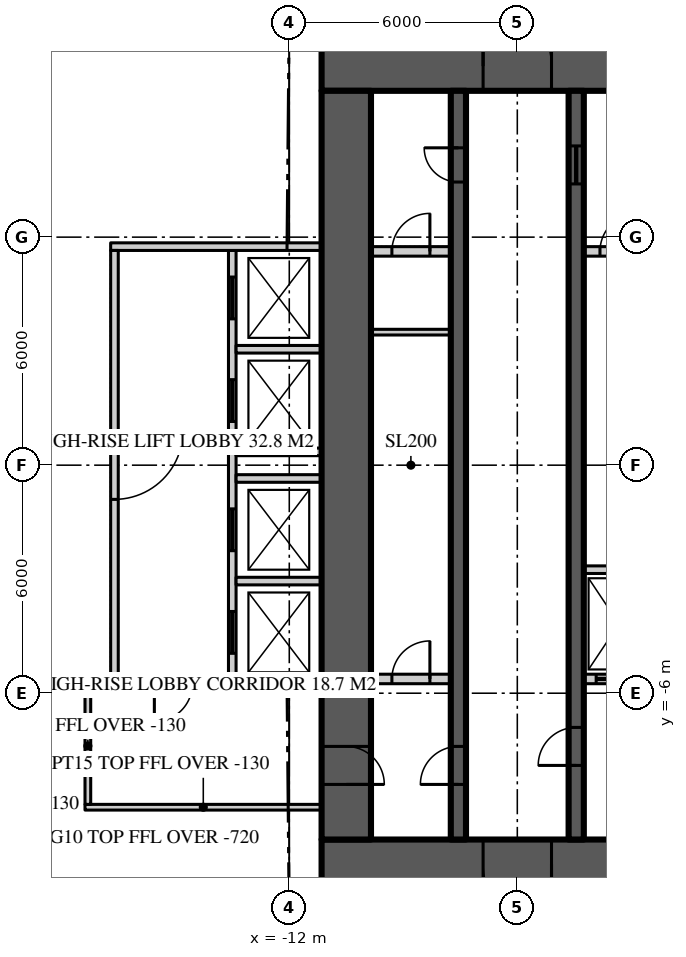
"""IFC4 building model, lengths in metres.
Left out: names, types, materials, properties, quantities, classifications, styles, units other than length and angle.
Written with IfcOpenShell. Run it as: python <this file> out.ifc"""

import sys

from ifc_helpers import new_model, si_unit, direction, frame, frame_2d, origin, place, context, subcontext, project, spatial, rectangle, extrude, element, fill, save


model = new_model("IFC4")
c1 = context("Model", 3, precision=1e-05, world=origin(), true_north=direction((0.0, 1.0)))
c2 = subcontext(c1, "Body", "Model", "MODEL_VIEW")
j1 = project(units=[si_unit("LENGTHUNIT", "METRE"), si_unit("PLANEANGLEUNIT", "RADIAN")], contexts=[c1])
p1 = place(None, origin())
s1 = spatial("IfcSite", under=j1, at=p1, CompositionType="ELEMENT")
p2 = place(p1, origin())
s2 = spatial("IfcBuilding", under=s1, at=p2, CompositionType="ELEMENT")
p3 = place(p2, frame((0.0, 0.0, 251.7)))
s3 = spatial("IfcBuildingStorey", under=s2, at=p3, CompositionType="ELEMENT", Elevation=251.7)
p4 = place(p3, frame((-11.15, 10.5, 0.0), z_axis=(0.0, 0.0, 1.0), x_axis=(1.0, 0.0, 0.0)))
e1 = element("IfcWall", 1, at=p4, inside=s3, PredefinedType="SHEAR", context=c2, shape_type="SweptSolid", body=[
    extrude(rectangle(XDim=22.3, YDim=1.3, at=frame_2d((11.15, 0.0))), origin(), (0.0, 0.0, 1.0), 3.9),
])
p5 = place(p4, frame((4.25, 0.0, 0.0)))
e2 = element("IfcOpeningElement", 2, at=p5, cuts=e1, PredefinedType="OPENING", context=c2, shape_type="SweptSolid", body=[
    extrude(rectangle(XDim=1.8, YDim=2.2, at=frame_2d((0.9, 1.1))), frame((0.0, 0.66, 0.0), z_axis=(0.0, -1.0, 0.0), x_axis=(1.0, 0.0, 0.0)), (0.0, 0.0, 1.0), 1.32),
])
p6 = place(p4, frame((16.25, 0.0, 0.0)))
e3 = element("IfcOpeningElement", 3, at=p6, cuts=e1, PredefinedType="OPENING", context=c2, shape_type="SweptSolid", body=[
    extrude(rectangle(XDim=1.8, YDim=2.2, at=frame_2d((0.9, 1.1))), frame((0.0, 0.66, 0.0), z_axis=(0.0, -1.0, 0.0), x_axis=(1.0, 0.0, 0.0)), (0.0, 0.0, 1.0), 1.32),
])
p7 = place(p3, frame((11.15, -10.5, 0.0), z_axis=(0.0, 0.0, 1.0), x_axis=(-1.0, 0.0, 0.0)))
e4 = element("IfcWall", 4, at=p7, inside=s3, PredefinedType="SHEAR", context=c2, shape_type="SweptSolid", body=[
    extrude(rectangle(XDim=22.3, YDim=1.3, at=frame_2d((11.15, 0.0))), origin(), (0.0, 0.0, 1.0), 3.9),
])
p8 = place(p7, frame((16.25, 0.0, 0.0)))
e5 = element("IfcOpeningElement", 5, at=p8, cuts=e4, PredefinedType="OPENING", context=c2, shape_type="SweptSolid", body=[
    extrude(rectangle(XDim=1.8, YDim=2.2, at=frame_2d((0.9, 1.1))), frame((0.0, 0.66, 0.0), z_axis=(0.0, -1.0, 0.0), x_axis=(1.0, 0.0, 0.0)), (0.0, 0.0, 1.0), 1.32),
])
p9 = place(p7, frame((4.25, 0.0, 0.0)))
e6 = element("IfcOpeningElement", 6, at=p9, cuts=e4, PredefinedType="OPENING", context=c2, shape_type="SweptSolid", body=[
    extrude(rectangle(XDim=1.8, YDim=2.2, at=frame_2d((0.9, 1.1))), frame((0.0, 0.66, 0.0), z_axis=(0.0, -1.0, 0.0), x_axis=(1.0, 0.0, 0.0)), (0.0, 0.0, 1.0), 1.32),
])
p10 = place(p3, frame((-10.5, 9.85, 0.0), z_axis=(0.0, 0.0, 1.0), x_axis=(0.0, -1.0, 0.0)))
e7 = element("IfcWall", 7, at=p10, inside=s3, PredefinedType="SHEAR", context=c2, shape_type="SweptSolid", body=[
    extrude(rectangle(XDim=19.7, YDim=1.3, at=frame_2d((9.85, 0.0))), origin(), (0.0, 0.0, 1.0), 3.9),
])
p11 = place(p10, frame((17.25, 0.0, 0.0)))
e8 = element("IfcOpeningElement", 8, at=p11, cuts=e7, PredefinedType="OPENING", context=c2, shape_type="SweptSolid", body=[
    extrude(rectangle(XDim=1.0, YDim=2.2, at=frame_2d((0.5, 1.1))), frame((0.0, 0.66, 0.0), z_axis=(0.0, -1.0, 0.0), x_axis=(1.0, 0.0, 0.0)), (0.0, 0.0, 1.0), 1.32),
])
p12 = place(p3, frame((-7.55, -9.85, 0.0), z_axis=(0.0, 0.0, 1.0), x_axis=(0.0, 1.0, 0.0)))
e9 = element("IfcWall", 9, at=p12, inside=s3, PredefinedType="SHEAR", context=c2, shape_type="SweptSolid", body=[
    extrude(rectangle(XDim=19.7, YDim=0.4, at=frame_2d((9.85, 0.0))), origin(), (0.0, 0.0, 1.0), 3.9),
])
p13 = place(p12, frame((1.45, 0.0, 0.0)))
e10 = element("IfcOpeningElement", 10, at=p13, cuts=e9, PredefinedType="OPENING", context=c2, shape_type="SweptSolid", body=[
    extrude(rectangle(XDim=1.0, YDim=2.2, at=frame_2d((0.5, 1.1))), frame((0.0, 0.21, 0.0), z_axis=(0.0, -1.0, 0.0), x_axis=(1.0, 0.0, 0.0)), (0.0, 0.0, 1.0), 0.42),
])
p14 = place(p12, frame((17.3, 0.0, 0.0)))
e11 = element("IfcOpeningElement", 11, at=p14, cuts=e9, PredefinedType="OPENING", context=c2, shape_type="SweptSolid", body=[
    extrude(rectangle(XDim=0.9, YDim=2.1, at=frame_2d((0.45, 1.05))), frame((0.0, 0.21, 0.0), z_axis=(0.0, -1.0, 0.0), x_axis=(1.0, 0.0, 0.0)), (0.0, 0.0, 1.0), 0.42),
])
p15 = place(p3, frame((-4.45, -9.85, 0.0), z_axis=(0.0, 0.0, 1.0), x_axis=(0.0, 1.0, 0.0)))
e12 = element("IfcWall", 12, at=p15, inside=s3, PredefinedType="SHEAR", context=c2, shape_type="SweptSolid", body=[
    extrude(rectangle(XDim=19.7, YDim=0.4, at=frame_2d((9.85, 0.0))), origin(), (0.0, 0.0, 1.0), 3.9),
])
p16 = place(p15, frame((1.95, 0.0, 0.0)))
e13 = element("IfcOpeningElement", 13, at=p16, cuts=e12, PredefinedType="OPENING", context=c2, shape_type="SweptSolid", body=[
    extrude(rectangle(XDim=1.0, YDim=2.2, at=frame_2d((0.5, 1.1))), frame((0.0, 0.21, 0.0), z_axis=(0.0, -1.0, 0.0), x_axis=(1.0, 0.0, 0.0)), (0.0, 0.0, 1.0), 0.42),
])
p17 = place(p15, frame((17.25, 0.0, 0.0)))
e14 = element("IfcOpeningElement", 14, at=p17, cuts=e12, PredefinedType="OPENING", context=c2, shape_type="SweptSolid", body=[
    extrude(rectangle(XDim=1.0, YDim=2.1, at=frame_2d((0.5, 1.05))), frame((0.0, 0.21, 0.0), z_axis=(0.0, -1.0, 0.0), x_axis=(1.0, 0.0, 0.0)), (0.0, 0.0, 1.0), 0.42),
])
p18 = place(p3, frame((-9.85, 5.625, 0.0), z_axis=(0.0, 0.0, 1.0), x_axis=(1.0, 0.0, 0.0)))
e15 = element("IfcWall", 15, at=p18, inside=s3, PredefinedType="SOLIDWALL", context=c2, shape_type="SweptSolid", body=[
    extrude(rectangle(XDim=2.1, YDim=0.25, at=frame_2d((1.05, 0.0))), origin(), (0.0, 0.0, 1.0), 3.7),
])
p19 = place(p18, frame((0.55, 0.0, 0.0)))
e16 = element("IfcOpeningElement", 16, at=p19, cuts=e15, PredefinedType="OPENING", context=c2, shape_type="SweptSolid", body=[
    extrude(rectangle(XDim=1.0, YDim=2.2, at=frame_2d((0.5, 1.1))), frame((0.0, 0.135, 0.0), z_axis=(0.0, -1.0, 0.0), x_axis=(1.0, 0.0, 0.0)), (0.0, 0.0, 1.0), 0.27),
])
p20 = place(p3, frame((-4.25, 5.625, 0.0), z_axis=(0.0, 0.0, 1.0), x_axis=(1.0, 0.0, 0.0)))
e17 = element("IfcWall", 17, at=p20, inside=s3, PredefinedType="SOLIDWALL", context=c2, shape_type="SweptSolid", body=[
    extrude(rectangle(XDim=1.85, YDim=0.25, at=frame_2d((0.925, 0.0))), origin(), (0.0, 0.0, 1.0), 3.7),
])
p21 = place(p20, frame((0.425, 0.0, 0.0)))
e18 = element("IfcOpeningElement", 18, at=p21, cuts=e17, PredefinedType="OPENING", context=c2, shape_type="SweptSolid", body=[
    extrude(rectangle(XDim=1.0, YDim=2.2, at=frame_2d((0.5, 1.1))), frame((0.0, 0.135, 0.0), z_axis=(0.0, -1.0, 0.0), x_axis=(1.0, 0.0, 0.0)), (0.0, 0.0, 1.0), 0.27),
])
p22 = place(p3, frame((-9.85, -5.625, 0.0), z_axis=(0.0, 0.0, 1.0), x_axis=(1.0, 0.0, 0.0)))
e19 = element("IfcWall", 19, at=p22, inside=s3, PredefinedType="SOLIDWALL", context=c2, shape_type="SweptSolid", body=[
    extrude(rectangle(XDim=2.1, YDim=0.25, at=frame_2d((1.05, 0.0))), origin(), (0.0, 0.0, 1.0), 3.7),
])
p23 = place(p22, frame((0.55, 0.0, 0.0)))
e20 = element("IfcOpeningElement", 20, at=p23, cuts=e19, PredefinedType="OPENING", context=c2, shape_type="SweptSolid", body=[
    extrude(rectangle(XDim=1.0, YDim=2.2, at=frame_2d((0.5, 1.1))), frame((0.0, 0.135, 0.0), z_axis=(0.0, -1.0, 0.0), x_axis=(1.0, 0.0, 0.0)), (0.0, 0.0, 1.0), 0.27),
])
p24 = place(p3, frame((-4.25, -5.625, 0.0), z_axis=(0.0, 0.0, 1.0), x_axis=(1.0, 0.0, 0.0)))
e21 = element("IfcWall", 21, at=p24, inside=s3, PredefinedType="SOLIDWALL", context=c2, shape_type="SweptSolid", body=[
    extrude(rectangle(XDim=1.85, YDim=0.25, at=frame_2d((0.925, 0.0))), origin(), (0.0, 0.0, 1.0), 3.7),
])
p25 = place(p24, frame((0.325, 0.0, 0.0)))
e22 = element("IfcOpeningElement", 22, at=p25, cuts=e21, PredefinedType="OPENING", context=c2, shape_type="SweptSolid", body=[
    extrude(rectangle(XDim=1.2, YDim=2.2, at=frame_2d((0.6, 1.1))), frame((0.0, 0.135, 0.0), z_axis=(0.0, -1.0, 0.0), x_axis=(1.0, 0.0, 0.0)), (0.0, 0.0, 1.0), 0.27),
])
p26 = place(p3, frame((-4.25, -2.75, 0.0), z_axis=(0.0, 0.0, 1.0), x_axis=(1.0, 0.0, 0.0)))
e23 = element("IfcWall", 23, at=p26, inside=s3, PredefinedType="SOLIDWALL", context=c2, shape_type="SweptSolid", body=[
    extrude(rectangle(XDim=1.85, YDim=0.2, at=frame_2d((0.925, 0.0))), origin(), (0.0, 0.0, 1.0), 3.7),
])
p27 = place(p3, frame((-13.5, 5.65, 0.0), z_axis=(0.0, 0.0, 1.0), x_axis=(0.0, -1.0, 0.0)))
e24 = element("IfcWall", 24, at=p27, inside=s3, PredefinedType="SOLIDWALL", context=c2, shape_type="SweptSolid", body=[
    extrude(rectangle(XDim=11.3, YDim=0.2, at=frame_2d((5.65, 0.0))), origin(), (0.0, 0.0, 1.0), 3.7),
])
p28 = place(p27, frame((0.7, 0.0, 0.0)))
e25 = element("IfcOpeningElement", 25, at=p28, cuts=e24, PredefinedType="OPENING", context=c2, shape_type="SweptSolid", body=[
    extrude(rectangle(XDim=1.1, YDim=2.2, at=frame_2d((0.55, 1.1))), frame((0.0, 0.11, 0.0), z_axis=(0.0, -1.0, 0.0), x_axis=(1.0, 0.0, 0.0)), (0.0, 0.0, 1.0), 0.22),
])
p29 = place(p27, frame((3.4, 0.0, 0.0)))
e26 = element("IfcOpeningElement", 26, at=p29, cuts=e24, PredefinedType="OPENING", context=c2, shape_type="SweptSolid", body=[
    extrude(rectangle(XDim=1.1, YDim=2.2, at=frame_2d((0.55, 1.1))), frame((0.0, 0.11, 0.0), z_axis=(0.0, -1.0, 0.0), x_axis=(1.0, 0.0, 0.0)), (0.0, 0.0, 1.0), 0.22),
])
p30 = place(p27, frame((6.8, 0.0, 0.0)))
e27 = element("IfcOpeningElement", 27, at=p30, cuts=e24, PredefinedType="OPENING", context=c2, shape_type="SweptSolid", body=[
    extrude(rectangle(XDim=1.1, YDim=2.2, at=frame_2d((0.55, 1.1))), frame((0.0, 0.11, 0.0), z_axis=(0.0, -1.0, 0.0), x_axis=(1.0, 0.0, 0.0)), (0.0, 0.0, 1.0), 0.22),
])
p31 = place(p27, frame((9.5, 0.0, 0.0)))
e28 = element("IfcOpeningElement", 28, at=p31, cuts=e24, PredefinedType="OPENING", context=c2, shape_type="SweptSolid", body=[
    extrude(rectangle(XDim=1.1, YDim=2.2, at=frame_2d((0.55, 1.1))), frame((0.0, 0.11, 0.0), z_axis=(0.0, -1.0, 0.0), x_axis=(1.0, 0.0, 0.0)), (0.0, 0.0, 1.0), 0.22),
])
p32 = place(p3, frame((-11.15, 5.75, 0.0), z_axis=(0.0, 0.0, 1.0), x_axis=(-1.0, 0.0, 0.0)))
e29 = element("IfcWall", 29, at=p32, inside=s3, PredefinedType="SOLIDWALL", context=c2, shape_type="SweptSolid", body=[
    extrude(rectangle(XDim=5.55, YDim=0.2, at=frame_2d((2.775, 0.0))), origin(), (0.0, 0.0, 1.0), 3.7),
])
p33 = place(p3, frame((-11.15, -5.75, 0.0), z_axis=(0.0, 0.0, 1.0), x_axis=(-1.0, 0.0, 0.0)))
e30 = element("IfcWall", 30, at=p33, inside=s3, PredefinedType="SOLIDWALL", context=c2, shape_type="SweptSolid", body=[
    extrude(rectangle(XDim=5.55, YDim=0.2, at=frame_2d((2.775, 0.0))), origin(), (0.0, 0.0, 1.0), 3.7),
])
p34 = place(p33, frame((3.4, 0.0, 0.0)))
e31 = element("IfcOpeningElement", 31, at=p34, cuts=e30, PredefinedType="OPENING", context=c2, shape_type="SweptSolid", body=[
    extrude(rectangle(XDim=1.0, YDim=2.2, at=frame_2d((0.5, 1.1))), frame((0.0, 0.11, 0.0), z_axis=(0.0, -1.0, 0.0), x_axis=(1.0, 0.0, 0.0)), (0.0, 0.0, 1.0), 0.22),
])
for number, where, z_axis, x_axis in (
    (32, (-11.15, 3.05, 0.0), (0.0, 0.0, 1.0), (-1.0, 0.0, 0.0)),
    (33, (-11.15, 0.35, 0.0), (0.0, 0.0, 1.0), (-1.0, 0.0, 0.0)),
    (34, (-11.15, -0.35, 0.0), (0.0, 0.0, 1.0), (-1.0, 0.0, 0.0)),
    (35, (-11.15, -3.05, 0.0), (0.0, 0.0, 1.0), (-1.0, 0.0, 0.0)),
):
    element("IfcWall", number, at=place(p3, frame(where, z_axis=z_axis, x_axis=x_axis)), inside=s3, PredefinedType="SOLIDWALL", context=c2, shape_type="SweptSolid", body=[
        extrude(rectangle(XDim=2.25, YDim=0.2, at=frame_2d((1.125, 0.0))), origin(), (0.0, 0.0, 1.0), 3.7),
    ])
p35 = place(p3, frame((-16.6, 5.65, 0.0), z_axis=(0.0, 0.0, 1.0), x_axis=(0.0, -1.0, 0.0)))
e36 = element("IfcWall", 36, at=p35, inside=s3, PredefinedType="SOLIDWALL", context=c2, shape_type="SweptSolid", body=[
    extrude(rectangle(XDim=11.3, YDim=0.2, at=frame_2d((5.65, 0.0))), origin(), (0.0, 0.0, 1.0), 3.18),
])
p36 = place(p35, frame((4.75, 0.0, 0.0)))
e37 = element("IfcOpeningElement", 37, at=p36, cuts=e36, PredefinedType="OPENING", context=c2, shape_type="SweptSolid", body=[
    extrude(rectangle(XDim=1.8, YDim=2.2, at=frame_2d((0.9, 1.1))), frame((0.0, 0.11, 0.0), z_axis=(0.0, -1.0, 0.0), x_axis=(1.0, 0.0, 0.0)), (0.0, 0.0, 1.0), 0.22),
])
p37 = place(p3, frame((-11.15, -9.0, 0.0), z_axis=(0.0, 0.0, 1.0), x_axis=(-1.0, 0.0, 0.0)))
e38 = element("IfcWall", 38, at=p37, inside=s3, PredefinedType="PARTITIONING", context=c2, shape_type="SweptSolid", body=[
    extrude(rectangle(XDim=6.225, YDim=0.15, at=frame_2d((3.113, 0.0))), origin(), (0.0, 0.0, 1.0), 3.77),
])
p38 = place(p3, frame((-17.3, -5.85, 0.0), z_axis=(0.0, 0.0, 1.0), x_axis=(0.0, -1.0, 0.0)))
e39 = element("IfcWall", 39, at=p38, inside=s3, PredefinedType="PARTITIONING", context=c2, shape_type="SweptSolid", body=[
    extrude(rectangle(XDim=3.075, YDim=0.15, at=frame_2d((1.538, 0.0))), origin(), (0.0, 0.0, 1.0), 3.77),
])
p39 = place(p3, frame((-9.85, 3.5, 0.0), z_axis=(0.0, 0.0, 1.0), x_axis=(1.0, 0.0, 0.0)))
e40 = element("IfcWall", 40, at=p39, inside=s3, PredefinedType="SOLIDWALL", context=c2, shape_type="SweptSolid", body=[
    extrude(rectangle(XDim=2.1, YDim=0.15, at=frame_2d((1.05, 0.0))), origin(), (0.0, 0.0, 1.0), 3.77),
])
p40 = place(p5, origin())
e41 = element("IfcDoor", 41, at=p40, inside=s3, OperationType="DOUBLE_DOOR_DOUBLE_SWING", PredefinedType="DOOR", context=c2, shape_type="SweptSolid", body=[
    extrude(rectangle(XDim=1.8, YDim=2.2, at=frame_2d((0.9, 1.1))), frame((0.0, 0.025, 0.0), z_axis=(0.0, -1.0, 0.0), x_axis=(1.0, 0.0, 0.0)), (0.0, 0.0, 1.0), 0.05),
])
fill(e2, e41)
p41 = place(p8, origin())
e42 = element("IfcDoor", 42, at=p41, inside=s3, OperationType="DOUBLE_DOOR_DOUBLE_SWING", PredefinedType="DOOR", context=c2, shape_type="SweptSolid", body=[
    extrude(rectangle(XDim=1.8, YDim=2.2, at=frame_2d((0.9, 1.1))), frame((0.0, 0.025, 0.0), z_axis=(0.0, -1.0, 0.0), x_axis=(1.0, 0.0, 0.0)), (0.0, 0.0, 1.0), 0.05),
])
fill(e5, e42)
p42 = place(p13, origin())
e43 = element("IfcDoor", 43, at=p42, inside=s3, OperationType="SINGLE_SWING_LEFT", PredefinedType="DOOR", context=c2, shape_type="SweptSolid", body=[
    extrude(rectangle(XDim=1.0, YDim=2.2, at=frame_2d((0.5, 1.1))), frame((0.0, 0.025, 0.0), z_axis=(0.0, -1.0, 0.0), x_axis=(1.0, 0.0, 0.0)), (0.0, 0.0, 1.0), 0.05),
])
fill(e10, e43)
p43 = place(p11, origin())
e44 = element("IfcDoor", 44, at=p43, inside=s3, OperationType="SINGLE_SWING_RIGHT", PredefinedType="DOOR", context=c2, shape_type="SweptSolid", body=[
    extrude(rectangle(XDim=1.0, YDim=2.2, at=frame_2d((0.5, 1.1))), frame((0.0, 0.025, 0.0), z_axis=(0.0, -1.0, 0.0), x_axis=(1.0, 0.0, 0.0)), (0.0, 0.0, 1.0), 0.05),
])
fill(e8, e44)
p44 = place(p16, origin())
e45 = element("IfcDoor", 45, at=p44, inside=s3, OperationType="SINGLE_SWING_LEFT", PredefinedType="DOOR", context=c2, shape_type="SweptSolid", body=[
    extrude(rectangle(XDim=1.0, YDim=2.2, at=frame_2d((0.5, 1.1))), frame((0.0, 0.025, 0.0), z_axis=(0.0, -1.0, 0.0), x_axis=(1.0, 0.0, 0.0)), (0.0, 0.0, 1.0), 0.05),
])
fill(e13, e45)
p45 = place(p14, origin())
e46 = element("IfcDoor", 46, at=p45, inside=s3, OperationType="SINGLE_SWING_RIGHT", PredefinedType="DOOR", context=c2, shape_type="SweptSolid", body=[
    extrude(rectangle(XDim=0.9, YDim=2.1, at=frame_2d((0.45, 1.05))), frame((0.0, 0.025, 0.0), z_axis=(0.0, -1.0, 0.0), x_axis=(1.0, 0.0, 0.0)), (0.0, 0.0, 1.0), 0.05),
])
fill(e11, e46)
p46 = place(p17, origin())
e47 = element("IfcDoor", 47, at=p46, inside=s3, OperationType="SLIDING_TO_LEFT", PredefinedType="DOOR", context=c2, shape_type="SweptSolid", body=[
    extrude(rectangle(XDim=1.0, YDim=2.1, at=frame_2d((0.5, 1.05))), frame((0.0, 0.025, 0.0), z_axis=(0.0, -1.0, 0.0), x_axis=(1.0, 0.0, 0.0)), (0.0, 0.0, 1.0), 0.05),
])
fill(e14, e47)
p47 = place(p25, origin())
e48 = element("IfcDoor", 48, at=p47, inside=s3, OperationType="SLIDING_TO_LEFT", PredefinedType="DOOR", context=c2, shape_type="SweptSolid", body=[
    extrude(rectangle(XDim=1.2, YDim=2.2, at=frame_2d((0.6, 1.1))), frame((0.0, 0.025, 0.0), z_axis=(0.0, -1.0, 0.0), x_axis=(1.0, 0.0, 0.0)), (0.0, 0.0, 1.0), 0.05),
])
fill(e22, e48)
p48 = place(p36, origin())
e49 = element("IfcDoor", 49, at=p48, inside=s3, OperationType="DOUBLE_DOOR_DOUBLE_SWING", PredefinedType="DOOR", context=c2, shape_type="SweptSolid", body=[
    extrude(rectangle(XDim=1.8, YDim=2.2, at=frame_2d((0.9, 1.1))), frame((0.0, 0.025, 0.0), z_axis=(0.0, -1.0, 0.0), x_axis=(1.0, 0.0, 0.0)), (0.0, 0.0, 1.0), 0.05),
])
fill(e37, e49)
p49 = place(p28, origin())
e50 = element("IfcDoor", 50, at=p49, inside=s3, OperationType="SLIDING_TO_LEFT", PredefinedType="DOOR", context=c2, shape_type="SweptSolid", body=[
    extrude(rectangle(XDim=1.1, YDim=2.2, at=frame_2d((0.55, 1.1))), frame((0.0, 0.025, 0.0), z_axis=(0.0, -1.0, 0.0), x_axis=(1.0, 0.0, 0.0)), (0.0, 0.0, 1.0), 0.05),
])
fill(e25, e50)
p50 = place(p29, origin())
e51 = element("IfcDoor", 51, at=p50, inside=s3, OperationType="SLIDING_TO_LEFT", PredefinedType="DOOR", context=c2, shape_type="SweptSolid", body=[
    extrude(rectangle(XDim=1.1, YDim=2.2, at=frame_2d((0.55, 1.1))), frame((0.0, 0.025, 0.0), z_axis=(0.0, -1.0, 0.0), x_axis=(1.0, 0.0, 0.0)), (0.0, 0.0, 1.0), 0.05),
])
fill(e26, e51)
p51 = place(p30, origin())
e52 = element("IfcDoor", 52, at=p51, inside=s3, OperationType="SLIDING_TO_LEFT", PredefinedType="DOOR", context=c2, shape_type="SweptSolid", body=[
    extrude(rectangle(XDim=1.1, YDim=2.2, at=frame_2d((0.55, 1.1))), frame((0.0, 0.025, 0.0), z_axis=(0.0, -1.0, 0.0), x_axis=(1.0, 0.0, 0.0)), (0.0, 0.0, 1.0), 0.05),
])
fill(e27, e52)
p52 = place(p31, origin())
e53 = element("IfcDoor", 53, at=p52, inside=s3, OperationType="SLIDING_TO_LEFT", PredefinedType="DOOR", context=c2, shape_type="SweptSolid", body=[
    extrude(rectangle(XDim=1.1, YDim=2.2, at=frame_2d((0.55, 1.1))), frame((0.0, 0.025, 0.0), z_axis=(0.0, -1.0, 0.0), x_axis=(1.0, 0.0, 0.0)), (0.0, 0.0, 1.0), 0.05),
])
fill(e28, e53)
p53 = place(p34, origin())
e54 = element("IfcDoor", 54, at=p53, inside=s3, OperationType="SINGLE_SWING_RIGHT", PredefinedType="DOOR", context=c2, shape_type="SweptSolid", body=[
    extrude(rectangle(XDim=1.0, YDim=2.2, at=frame_2d((0.5, 1.1))), frame((0.0, 0.025, 0.0), z_axis=(0.0, -1.0, 0.0), x_axis=(1.0, 0.0, 0.0)), (0.0, 0.0, 1.0), 0.05),
])
fill(e31, e54)
p54 = place(p19, origin())
e55 = element("IfcDoor", 55, at=p54, inside=s3, OperationType="SINGLE_SWING_RIGHT", PredefinedType="DOOR", context=c2, shape_type="SweptSolid", body=[
    extrude(rectangle(XDim=1.0, YDim=2.2, at=frame_2d((0.5, 1.1))), frame((0.0, 0.025, 0.0), z_axis=(0.0, -1.0, 0.0), x_axis=(1.0, 0.0, 0.0)), (0.0, 0.0, 1.0), 0.05),
])
fill(e16, e55)
p55 = place(p23, origin())
e56 = element("IfcDoor", 56, at=p55, inside=s3, OperationType="SINGLE_SWING_RIGHT", PredefinedType="DOOR", context=c2, shape_type="SweptSolid", body=[
    extrude(rectangle(XDim=1.0, YDim=2.2, at=frame_2d((0.5, 1.1))), frame((0.0, 0.025, 0.0), z_axis=(0.0, -1.0, 0.0), x_axis=(1.0, 0.0, 0.0)), (0.0, 0.0, 1.0), 0.05),
])
fill(e20, e56)
p56 = place(p21, origin())
e57 = element("IfcDoor", 57, at=p56, inside=s3, OperationType="SINGLE_SWING_RIGHT", PredefinedType="DOOR", context=c2, shape_type="SweptSolid", body=[
    extrude(rectangle(XDim=1.0, YDim=2.2, at=frame_2d((0.5, 1.1))), frame((0.0, 0.025, 0.0), z_axis=(0.0, -1.0, 0.0), x_axis=(1.0, 0.0, 0.0)), (0.0, 0.0, 1.0), 0.05),
])
fill(e18, e57)
save(model, sys.argv[1])
